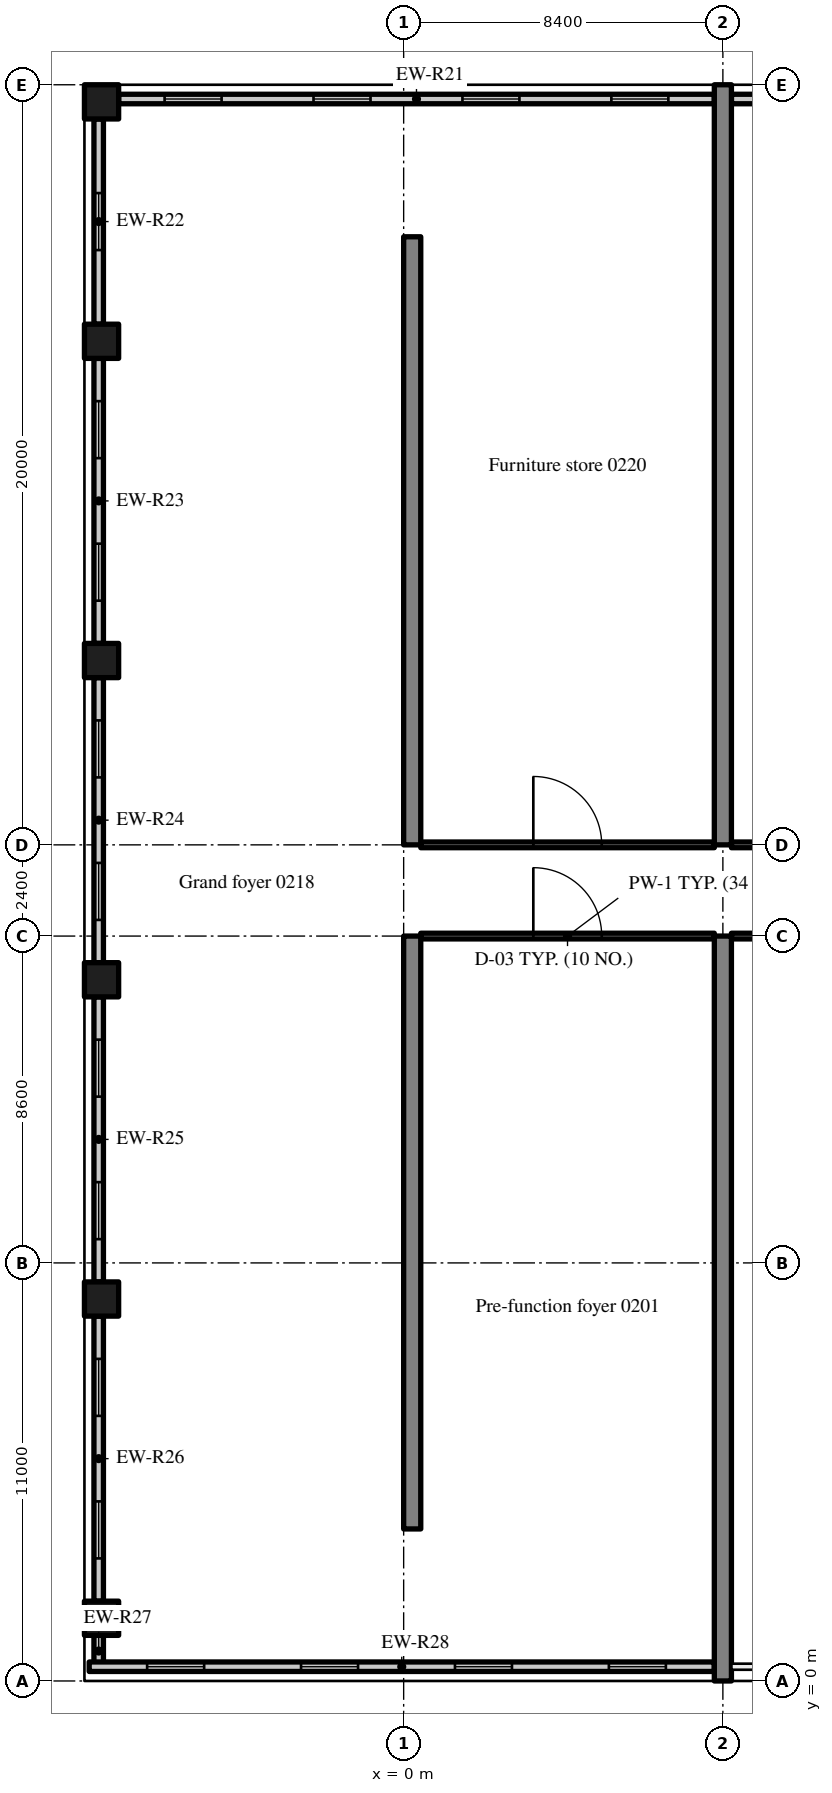
"""IFC4 building model, lengths in metres.
Left out: names, types, materials, properties, quantities, classifications, styles, units other than length and angle.
Written with IfcOpenShell. Run it as: python <this file> out.ifc"""

import sys

from ifc_helpers import new_model, si_unit, direction, frame, frame_2d, origin, origin_2d, place, context, subcontext, project, spatial, rectangle, extrude, source, transform, mapped, element, fill, save


model = new_model("IFC4")
c1 = context("Model", 3, precision=1e-05, world=origin(), true_north=direction((0.0, 1.0)))
c2 = subcontext(c1, "Body", "Model", "MODEL_VIEW")
j1 = project(units=[si_unit("LENGTHUNIT", "METRE"), si_unit("PLANEANGLEUNIT", "RADIAN")], contexts=[c1])
p1 = place(None, origin())
s1 = spatial("IfcSite", under=j1, at=p1, CompositionType="ELEMENT")
p2 = place(p1, origin())
s2 = spatial("IfcBuilding", under=s1, at=p2, CompositionType="ELEMENT")
p3 = place(p2, frame((0.0, 0.0, 11.4)))
s3 = spatial("IfcBuildingStorey", under=s2, at=p3, CompositionType="ELEMENT", Elevation=11.4)
m1 = source(origin(), c2, "Body", "SweptSolid", [
    extrude(rectangle(XDim=15.6, YDim=0.45, at=frame_2d((7.8, 0.0))), origin(), (0.0, 0.0, 1.0), 6.32),
])
p4 = place(p3, frame((0.225, 4.0, 0.0), z_axis=(0.0, 0.0, 1.0), x_axis=(0.0, 1.0, 0.0)))
e1 = element("IfcWall", 1, at=p4, inside=s3, PredefinedType="SHEAR", context=c2, shape_type="MappedRepresentation", body=[
    mapped(m1, transform((0.0, 0.0, 0.0), scale=1.0)),
])
m2 = source(origin(), c2, "Body", "SweptSolid", [
    extrude(rectangle(XDim=16.0, YDim=0.45, at=frame_2d((8.0, 0.0))), origin(), (0.0, 0.0, 1.0), 6.32),
])
p5 = place(p3, frame((0.225, 22.0, 0.0), z_axis=(0.0, 0.0, 1.0), x_axis=(0.0, 1.0, 0.0)))
e2 = element("IfcWall", 2, at=p5, inside=s3, PredefinedType="SHEAR", context=c2, shape_type="MappedRepresentation", body=[
    mapped(m2, transform((0.0, 0.0, 0.0), scale=1.0)),
])
m3 = source(origin(), c2, "Body", "SweptSolid", [
    extrude(rectangle(XDim=19.6, YDim=0.45, at=frame_2d((9.8, 0.0))), origin(), (0.0, 0.0, 1.0), 6.32),
])
p6 = place(p3, frame((8.4, 0.0, 0.0), z_axis=(0.0, 0.0, 1.0), x_axis=(0.0, 1.0, 0.0)))
e3 = element("IfcWall", 3, at=p6, inside=s3, PredefinedType="SHEAR", context=c2, shape_type="MappedRepresentation", body=[
    mapped(m3, transform((0.0, 0.0, 0.0), scale=1.0)),
])
m4 = source(origin(), c2, "Body", "SweptSolid", [
    extrude(rectangle(XDim=20.0, YDim=0.45, at=frame_2d((10.0, 0.0))), origin(), (0.0, 0.0, 1.0), 6.32),
])
p7 = place(p3, frame((8.4, 22.0, 0.0), z_axis=(0.0, 0.0, 1.0), x_axis=(0.0, 1.0, 0.0)))
e4 = element("IfcWall", 4, at=p7, inside=s3, PredefinedType="SHEAR", context=c2, shape_type="MappedRepresentation", body=[
    mapped(m4, transform((0.0, 0.0, 0.0), scale=1.0)),
])
m5 = source(origin(), c2, "Body", "SweptSolid", [
    extrude(rectangle(XDim=0.9, YDim=0.9, at=origin_2d()), origin(), (0.0, 0.0, 1.0), 6.32),
])
for number, where, z_axis, x_axis in (
    (5, (-7.95, 1.65, 0.0), (0.0, 0.0, 1.0), (1.0, 0.0, 0.0)),
    (6, (-7.95, 10.05, 0.0), (0.0, 0.0, 1.0), (1.0, 0.0, 0.0)),
    (7, (-7.95, 18.45, 0.0), (0.0, 0.0, 1.0), (1.0, 0.0, 0.0)),
    (8, (-7.95, 26.85, 0.0), (0.0, 0.0, 1.0), (1.0, 0.0, 0.0)),
    (9, (-7.95, 35.25, 0.0), (0.0, 0.0, 1.0), (1.0, 0.0, 0.0)),
    (10, (-7.95, 41.55, 0.0), (0.0, 0.0, 1.0), (1.0, 0.0, 0.0)),
):
    element("IfcColumn", number, at=place(p3, frame(where, z_axis=z_axis, x_axis=x_axis)), inside=s3, PredefinedType="COLUMN", context=c2, shape_type="MappedRepresentation", body=[
        mapped(m5, transform((0.0, 0.0, 0.0), scale=1.0)),
    ])
m6 = source(origin(), c2, "Body", "SweptSolid", [
    extrude(rectangle(XDim=3.525, YDim=0.25, at=frame_2d((1.762, 0.0))), origin(), (0.0, 0.0, 1.0), 5.57),
])
p8 = place(p3, frame((12.15, 41.625, 0.0), z_axis=(0.0, 0.0, 1.0), x_axis=(-1.0, 0.0, 0.0)))
e11 = element("IfcWall", 11, at=p8, inside=s3, PredefinedType="SOLIDWALL", context=c2, shape_type="MappedRepresentation", body=[
    mapped(m6, transform((0.0, 0.0, 0.0), scale=1.0)),
])
m7 = source(origin(), c2, "Body", "SweptSolid", [
    extrude(rectangle(XDim=1.5, YDim=1.5, at=frame_2d((0.75, 0.75))), frame((0.0, 0.135, 0.0), z_axis=(0.0, -1.0, 0.0), x_axis=(1.0, 0.0, 0.0)), (0.0, 0.0, 1.0), 0.27),
])
p9 = place(p8, frame((1.012, 0.0, 0.9)))
e12 = element("IfcOpeningElement", 12, at=p9, cuts=e11, PredefinedType="OPENING", context=c2, shape_type="MappedRepresentation", body=[
    mapped(m7, transform((0.0, 0.0, 0.0), scale=1.0)),
])
m8 = source(origin(), c2, "Body", "SweptSolid", [
    extrude(rectangle(XDim=15.675, YDim=0.25, at=frame_2d((7.837, 0.0))), origin(), (0.0, 0.0, 1.0), 5.57),
])
p10 = place(p3, frame((8.175, 41.625, 0.0), z_axis=(0.0, 0.0, 1.0), x_axis=(-1.0, 0.0, 0.0)))
e13 = element("IfcWall", 13, at=p10, inside=s3, PredefinedType="SOLIDWALL", context=c2, shape_type="MappedRepresentation", body=[
    mapped(m8, transform((0.0, 0.0, 0.0), scale=1.0)),
])
p11 = place(p10, frame((1.209, 0.0, 0.9)))
e14 = element("IfcOpeningElement", 14, at=p11, cuts=e13, PredefinedType="OPENING", context=c2, shape_type="MappedRepresentation", body=[
    mapped(m7, transform((0.0, 0.0, 0.0), scale=1.0)),
])
p12 = place(p10, frame((5.128, 0.0, 0.9)))
e15 = element("IfcOpeningElement", 15, at=p12, cuts=e13, PredefinedType="OPENING", context=c2, shape_type="MappedRepresentation", body=[
    mapped(m7, transform((0.0, 0.0, 0.0), scale=1.0)),
])
p13 = place(p10, frame((9.047, 0.0, 0.9)))
e16 = element("IfcOpeningElement", 16, at=p13, cuts=e13, PredefinedType="OPENING", context=c2, shape_type="MappedRepresentation", body=[
    mapped(m7, transform((0.0, 0.0, 0.0), scale=1.0)),
])
p14 = place(p10, frame((12.966, 0.0, 0.9)))
e17 = element("IfcOpeningElement", 17, at=p14, cuts=e13, PredefinedType="OPENING", context=c2, shape_type="MappedRepresentation", body=[
    mapped(m7, transform((0.0, 0.0, 0.0), scale=1.0)),
])
m9 = source(origin(), c2, "Body", "SweptSolid", [
    extrude(rectangle(XDim=5.4, YDim=0.25, at=frame_2d((2.7, 0.0))), origin(), (0.0, 0.0, 1.0), 5.32),
])
p15 = place(p3, frame((-8.025, 41.1, 0.0), z_axis=(0.0, 0.0, 1.0), x_axis=(0.0, -1.0, 0.0)))
e18 = element("IfcWall", 18, at=p15, inside=s3, PredefinedType="SOLIDWALL", context=c2, shape_type="MappedRepresentation", body=[
    mapped(m9, transform((0.0, 0.0, 0.0), scale=1.0)),
])
m10 = source(origin(), c2, "Body", "SweptSolid", [
    extrude(rectangle(XDim=1.5, YDim=2.0, at=frame_2d((0.75, 1.0))), frame((0.0, 0.135, 0.0), z_axis=(0.0, -1.0, 0.0), x_axis=(1.0, 0.0, 0.0)), (0.0, 0.0, 1.0), 0.27),
])
p16 = place(p15, frame((1.95, 0.0, 0.9)))
e19 = element("IfcOpeningElement", 19, at=p16, cuts=e18, PredefinedType="OPENING", context=c2, shape_type="MappedRepresentation", body=[
    mapped(m10, transform((0.0, 0.0, 0.0), scale=1.0)),
])
m11 = source(origin(), c2, "Body", "SweptSolid", [
    extrude(rectangle(XDim=7.5, YDim=0.25, at=frame_2d((3.75, 0.0))), origin(), (0.0, 0.0, 1.0), 5.32),
])
p17 = place(p3, frame((-8.025, 34.8, 0.0), z_axis=(0.0, 0.0, 1.0), x_axis=(0.0, -1.0, 0.0)))
e20 = element("IfcWall", 20, at=p17, inside=s3, PredefinedType="SOLIDWALL", context=c2, shape_type="MappedRepresentation", body=[
    mapped(m11, transform((0.0, 0.0, 0.0), scale=1.0)),
])
p18 = place(p17, frame((1.125, 0.0, 0.9)))
e21 = element("IfcOpeningElement", 21, at=p18, cuts=e20, PredefinedType="OPENING", context=c2, shape_type="MappedRepresentation", body=[
    mapped(m10, transform((0.0, 0.0, 0.0), scale=1.0)),
])
p19 = place(p17, frame((4.875, 0.0, 0.9)))
e22 = element("IfcOpeningElement", 22, at=p19, cuts=e20, PredefinedType="OPENING", context=c2, shape_type="MappedRepresentation", body=[
    mapped(m10, transform((0.0, 0.0, 0.0), scale=1.0)),
])
p20 = place(p3, frame((-8.025, 26.4, 0.0), z_axis=(0.0, 0.0, 1.0), x_axis=(0.0, -1.0, 0.0)))
e23 = element("IfcWall", 23, at=p20, inside=s3, PredefinedType="SOLIDWALL", context=c2, shape_type="MappedRepresentation", body=[
    mapped(m11, transform((0.0, 0.0, 0.0), scale=1.0)),
])
p21 = place(p20, frame((1.125, 0.0, 0.9)))
e24 = element("IfcOpeningElement", 24, at=p21, cuts=e23, PredefinedType="OPENING", context=c2, shape_type="MappedRepresentation", body=[
    mapped(m10, transform((0.0, 0.0, 0.0), scale=1.0)),
])
p22 = place(p20, frame((4.875, 0.0, 0.9)))
e25 = element("IfcOpeningElement", 25, at=p22, cuts=e23, PredefinedType="OPENING", context=c2, shape_type="MappedRepresentation", body=[
    mapped(m10, transform((0.0, 0.0, 0.0), scale=1.0)),
])
p23 = place(p3, frame((-8.025, 18.0, 0.0), z_axis=(0.0, 0.0, 1.0), x_axis=(0.0, -1.0, 0.0)))
e26 = element("IfcWall", 26, at=p23, inside=s3, PredefinedType="SOLIDWALL", context=c2, shape_type="MappedRepresentation", body=[
    mapped(m11, transform((0.0, 0.0, 0.0), scale=1.0)),
])
p24 = place(p23, frame((1.125, 0.0, 0.9)))
e27 = element("IfcOpeningElement", 27, at=p24, cuts=e26, PredefinedType="OPENING", context=c2, shape_type="MappedRepresentation", body=[
    mapped(m10, transform((0.0, 0.0, 0.0), scale=1.0)),
])
p25 = place(p23, frame((4.875, 0.0, 0.9)))
e28 = element("IfcOpeningElement", 28, at=p25, cuts=e26, PredefinedType="OPENING", context=c2, shape_type="MappedRepresentation", body=[
    mapped(m10, transform((0.0, 0.0, 0.0), scale=1.0)),
])
p26 = place(p3, frame((-8.025, 9.6, 0.0), z_axis=(0.0, 0.0, 1.0), x_axis=(0.0, -1.0, 0.0)))
e29 = element("IfcWall", 29, at=p26, inside=s3, PredefinedType="SOLIDWALL", context=c2, shape_type="MappedRepresentation", body=[
    mapped(m11, transform((0.0, 0.0, 0.0), scale=1.0)),
])
p27 = place(p26, frame((1.125, 0.0, 0.9)))
e30 = element("IfcOpeningElement", 30, at=p27, cuts=e29, PredefinedType="OPENING", context=c2, shape_type="MappedRepresentation", body=[
    mapped(m10, transform((0.0, 0.0, 0.0), scale=1.0)),
])
p28 = place(p26, frame((4.875, 0.0, 0.9)))
e31 = element("IfcOpeningElement", 31, at=p28, cuts=e29, PredefinedType="OPENING", context=c2, shape_type="MappedRepresentation", body=[
    mapped(m10, transform((0.0, 0.0, 0.0), scale=1.0)),
])
m12 = source(origin(), c2, "Body", "SweptSolid", [
    extrude(rectangle(XDim=0.825, YDim=0.25, at=frame_2d((0.413, 0.0))), origin(), (0.0, 0.0, 1.0), 5.32),
])
p29 = place(p3, frame((-8.025, 1.2, 0.0), z_axis=(0.0, 0.0, 1.0), x_axis=(0.0, -1.0, 0.0)))
e32 = element("IfcWall", 32, at=p29, inside=s3, PredefinedType="SOLIDWALL", context=c2, shape_type="MappedRepresentation", body=[
    mapped(m12, transform((0.0, 0.0, 0.0), scale=1.0)),
])
m13 = source(origin(), c2, "Body", "SweptSolid", [
    extrude(rectangle(XDim=16.45, YDim=0.25, at=frame_2d((8.225, 0.0))), origin(), (0.0, 0.0, 1.0), 5.57),
])
p30 = place(p3, frame((-8.275, 0.375, 0.0), z_axis=(0.0, 0.0, 1.0), x_axis=(1.0, 0.0, 0.0)))
e33 = element("IfcWall", 33, at=p30, inside=s3, PredefinedType="SOLIDWALL", context=c2, shape_type="MappedRepresentation", body=[
    mapped(m13, transform((0.0, 0.0, 0.0), scale=1.0)),
])
p31 = place(p30, frame((1.525, 0.0, 0.9)))
e34 = element("IfcOpeningElement", 34, at=p31, cuts=e33, PredefinedType="OPENING", context=c2, shape_type="MappedRepresentation", body=[
    mapped(m10, transform((0.0, 0.0, 0.0), scale=1.0)),
])
p32 = place(p30, frame((5.575, 0.0, 0.9)))
e35 = element("IfcOpeningElement", 35, at=p32, cuts=e33, PredefinedType="OPENING", context=c2, shape_type="MappedRepresentation", body=[
    mapped(m10, transform((0.0, 0.0, 0.0), scale=1.0)),
])
p33 = place(p30, frame((9.625, 0.0, 0.9)))
e36 = element("IfcOpeningElement", 36, at=p33, cuts=e33, PredefinedType="OPENING", context=c2, shape_type="MappedRepresentation", body=[
    mapped(m10, transform((0.0, 0.0, 0.0), scale=1.0)),
])
p34 = place(p30, frame((13.675, 0.0, 0.9)))
e37 = element("IfcOpeningElement", 37, at=p34, cuts=e33, PredefinedType="OPENING", context=c2, shape_type="MappedRepresentation", body=[
    mapped(m10, transform((0.0, 0.0, 0.0), scale=1.0)),
])
m14 = source(origin(), c2, "Body", "SweptSolid", [
    extrude(rectangle(XDim=7.725, YDim=0.15, at=frame_2d((3.863, 0.0))), origin(), (0.0, 0.0, 1.0), 5.62),
])
p35 = place(p3, frame((0.45, 19.6, 0.0), z_axis=(0.0, 0.0, 1.0), x_axis=(1.0, 0.0, 0.0)))
e38 = element("IfcWall", 38, at=p35, inside=s3, PredefinedType="PARTITIONING", context=c2, shape_type="MappedRepresentation", body=[
    mapped(m14, transform((0.0, 0.0, 0.0), scale=1.0)),
])
m15 = source(origin(), c2, "Body", "SweptSolid", [
    extrude(rectangle(XDim=1.8, YDim=2.1, at=frame_2d((0.9, 1.05))), frame((0.0, 0.085, 0.0), z_axis=(0.0, -1.0, 0.0), x_axis=(1.0, 0.0, 0.0)), (0.0, 0.0, 1.0), 0.17),
])
p36 = place(p35, frame((2.962, 0.0, 0.0)))
e39 = element("IfcOpeningElement", 39, at=p36, cuts=e38, PredefinedType="OPENING", context=c2, shape_type="MappedRepresentation", body=[
    mapped(m15, transform((0.0, 0.0, 0.0), scale=1.0)),
])
m16 = source(origin(), c2, "Body", "SweptSolid", [
    extrude(rectangle(XDim=7.95, YDim=0.15, at=frame_2d((3.975, 0.0))), origin(), (0.0, 0.0, 1.0), 5.62),
])
p37 = place(p3, frame((8.625, 19.6, 0.0), z_axis=(0.0, 0.0, 1.0), x_axis=(1.0, 0.0, 0.0)))
e40 = element("IfcWall", 40, at=p37, inside=s3, PredefinedType="PARTITIONING", context=c2, shape_type="MappedRepresentation", body=[
    mapped(m16, transform((0.0, 0.0, 0.0), scale=1.0)),
])
p38 = place(p37, frame((3.075, 0.0, 0.0)))
e41 = element("IfcOpeningElement", 41, at=p38, cuts=e40, PredefinedType="OPENING", context=c2, shape_type="MappedRepresentation", body=[
    mapped(m15, transform((0.0, 0.0, 0.0), scale=1.0)),
])
p39 = place(p3, frame((0.45, 22.0, 0.0), z_axis=(0.0, 0.0, 1.0), x_axis=(1.0, 0.0, 0.0)))
e42 = element("IfcWall", 42, at=p39, inside=s3, PredefinedType="PARTITIONING", context=c2, shape_type="MappedRepresentation", body=[
    mapped(m14, transform((0.0, 0.0, 0.0), scale=1.0)),
])
p40 = place(p39, frame((2.962, 0.0, 0.0)))
e43 = element("IfcOpeningElement", 43, at=p40, cuts=e42, PredefinedType="OPENING", context=c2, shape_type="MappedRepresentation", body=[
    mapped(m15, transform((0.0, 0.0, 0.0), scale=1.0)),
])
p41 = place(p3, frame((8.625, 22.0, 0.0), z_axis=(0.0, 0.0, 1.0), x_axis=(1.0, 0.0, 0.0)))
e44 = element("IfcWall", 44, at=p41, inside=s3, PredefinedType="PARTITIONING", context=c2, shape_type="MappedRepresentation", body=[
    mapped(m16, transform((0.0, 0.0, 0.0), scale=1.0)),
])
p42 = place(p41, frame((3.075, 0.0, 0.0)))
e45 = element("IfcOpeningElement", 45, at=p42, cuts=e44, PredefinedType="OPENING", context=c2, shape_type="MappedRepresentation", body=[
    mapped(m15, transform((0.0, 0.0, 0.0), scale=1.0)),
])
m17 = source(origin(), c2, "Body", "SweptSolid", [
    extrude(rectangle(XDim=1.5, YDim=1.5, at=frame_2d((0.75, 0.75))), frame((0.0, 0.03, 0.0), z_axis=(0.0, -1.0, 0.0), x_axis=(1.0, 0.0, 0.0)), (0.0, 0.0, 1.0), 0.06),
])
p43 = place(p11, origin())
e46 = element("IfcWindow", 46, at=p43, inside=s3, PartitioningType="SINGLE_PANEL", PredefinedType="WINDOW", context=c2, shape_type="MappedRepresentation", body=[
    mapped(m17, transform((0.0, 0.0, 0.0), scale=1.0)),
])
fill(e14, e46)
p44 = place(p12, origin())
e47 = element("IfcWindow", 47, at=p44, inside=s3, PartitioningType="SINGLE_PANEL", PredefinedType="WINDOW", context=c2, shape_type="MappedRepresentation", body=[
    mapped(m17, transform((0.0, 0.0, 0.0), scale=1.0)),
])
fill(e15, e47)
p45 = place(p13, origin())
e48 = element("IfcWindow", 48, at=p45, inside=s3, PartitioningType="SINGLE_PANEL", PredefinedType="WINDOW", context=c2, shape_type="MappedRepresentation", body=[
    mapped(m17, transform((0.0, 0.0, 0.0), scale=1.0)),
])
fill(e16, e48)
p46 = place(p14, origin())
e49 = element("IfcWindow", 49, at=p46, inside=s3, PartitioningType="SINGLE_PANEL", PredefinedType="WINDOW", context=c2, shape_type="MappedRepresentation", body=[
    mapped(m17, transform((0.0, 0.0, 0.0), scale=1.0)),
])
fill(e17, e49)
m18 = source(origin(), c2, "Body", "SweptSolid", [
    extrude(rectangle(XDim=1.5, YDim=2.0, at=frame_2d((0.75, 1.0))), frame((0.0, 0.03, 0.0), z_axis=(0.0, -1.0, 0.0), x_axis=(1.0, 0.0, 0.0)), (0.0, 0.0, 1.0), 0.06),
])
p47 = place(p16, origin())
e50 = element("IfcWindow", 50, at=p47, inside=s3, PartitioningType="SINGLE_PANEL", PredefinedType="WINDOW", context=c2, shape_type="MappedRepresentation", body=[
    mapped(m18, transform((0.0, 0.0, 0.0), scale=1.0)),
])
fill(e19, e50)
p48 = place(p18, origin())
e51 = element("IfcWindow", 51, at=p48, inside=s3, PartitioningType="SINGLE_PANEL", PredefinedType="WINDOW", context=c2, shape_type="MappedRepresentation", body=[
    mapped(m18, transform((0.0, 0.0, 0.0), scale=1.0)),
])
fill(e21, e51)
p49 = place(p19, origin())
e52 = element("IfcWindow", 52, at=p49, inside=s3, PartitioningType="SINGLE_PANEL", PredefinedType="WINDOW", context=c2, shape_type="MappedRepresentation", body=[
    mapped(m18, transform((0.0, 0.0, 0.0), scale=1.0)),
])
fill(e22, e52)
p50 = place(p21, origin())
e53 = element("IfcWindow", 53, at=p50, inside=s3, PartitioningType="SINGLE_PANEL", PredefinedType="WINDOW", context=c2, shape_type="MappedRepresentation", body=[
    mapped(m18, transform((0.0, 0.0, 0.0), scale=1.0)),
])
fill(e24, e53)
p51 = place(p22, origin())
e54 = element("IfcWindow", 54, at=p51, inside=s3, PartitioningType="SINGLE_PANEL", PredefinedType="WINDOW", context=c2, shape_type="MappedRepresentation", body=[
    mapped(m18, transform((0.0, 0.0, 0.0), scale=1.0)),
])
fill(e25, e54)
p52 = place(p24, origin())
e55 = element("IfcWindow", 55, at=p52, inside=s3, PartitioningType="SINGLE_PANEL", PredefinedType="WINDOW", context=c2, shape_type="MappedRepresentation", body=[
    mapped(m18, transform((0.0, 0.0, 0.0), scale=1.0)),
])
fill(e27, e55)
p53 = place(p25, origin())
e56 = element("IfcWindow", 56, at=p53, inside=s3, PartitioningType="SINGLE_PANEL", PredefinedType="WINDOW", context=c2, shape_type="MappedRepresentation", body=[
    mapped(m18, transform((0.0, 0.0, 0.0), scale=1.0)),
])
fill(e28, e56)
p54 = place(p27, origin())
e57 = element("IfcWindow", 57, at=p54, inside=s3, PartitioningType="SINGLE_PANEL", PredefinedType="WINDOW", context=c2, shape_type="MappedRepresentation", body=[
    mapped(m18, transform((0.0, 0.0, 0.0), scale=1.0)),
])
fill(e30, e57)
p55 = place(p28, origin())
e58 = element("IfcWindow", 58, at=p55, inside=s3, PartitioningType="SINGLE_PANEL", PredefinedType="WINDOW", context=c2, shape_type="MappedRepresentation", body=[
    mapped(m18, transform((0.0, 0.0, 0.0), scale=1.0)),
])
fill(e31, e58)
p56 = place(p31, origin())
e59 = element("IfcWindow", 59, at=p56, inside=s3, PartitioningType="SINGLE_PANEL", PredefinedType="WINDOW", context=c2, shape_type="MappedRepresentation", body=[
    mapped(m18, transform((0.0, 0.0, 0.0), scale=1.0)),
])
fill(e34, e59)
p57 = place(p32, origin())
e60 = element("IfcWindow", 60, at=p57, inside=s3, PartitioningType="SINGLE_PANEL", PredefinedType="WINDOW", context=c2, shape_type="MappedRepresentation", body=[
    mapped(m18, transform((0.0, 0.0, 0.0), scale=1.0)),
])
fill(e35, e60)
p58 = place(p33, origin())
e61 = element("IfcWindow", 61, at=p58, inside=s3, PartitioningType="SINGLE_PANEL", PredefinedType="WINDOW", context=c2, shape_type="MappedRepresentation", body=[
    mapped(m18, transform((0.0, 0.0, 0.0), scale=1.0)),
])
fill(e36, e61)
p59 = place(p34, origin())
e62 = element("IfcWindow", 62, at=p59, inside=s3, PartitioningType="SINGLE_PANEL", PredefinedType="WINDOW", context=c2, shape_type="MappedRepresentation", body=[
    mapped(m18, transform((0.0, 0.0, 0.0), scale=1.0)),
])
fill(e37, e62)
m19 = source(origin(), c2, "Body", "SweptSolid", [
    extrude(rectangle(XDim=1.8, YDim=2.1, at=frame_2d((0.9, 1.05))), frame((0.0, 0.025, 0.0), z_axis=(0.0, -1.0, 0.0), x_axis=(1.0, 0.0, 0.0)), (0.0, 0.0, 1.0), 0.05),
])
p60 = place(p36, origin())
e63 = element("IfcDoor", 63, at=p60, inside=s3, OperationType="DOUBLE_DOOR_SINGLE_SWING", PredefinedType="DOOR", context=c2, shape_type="MappedRepresentation", body=[
    mapped(m19, transform((0.0, 0.0, 0.0), scale=1.0)),
])
fill(e39, e63)
p61 = place(p40, origin())
e64 = element("IfcDoor", 64, at=p61, inside=s3, OperationType="DOUBLE_DOOR_SINGLE_SWING", PredefinedType="DOOR", context=c2, shape_type="MappedRepresentation", body=[
    mapped(m19, transform((0.0, 0.0, 0.0), scale=1.0)),
])
fill(e43, e64)
save(model, sys.argv[1])
